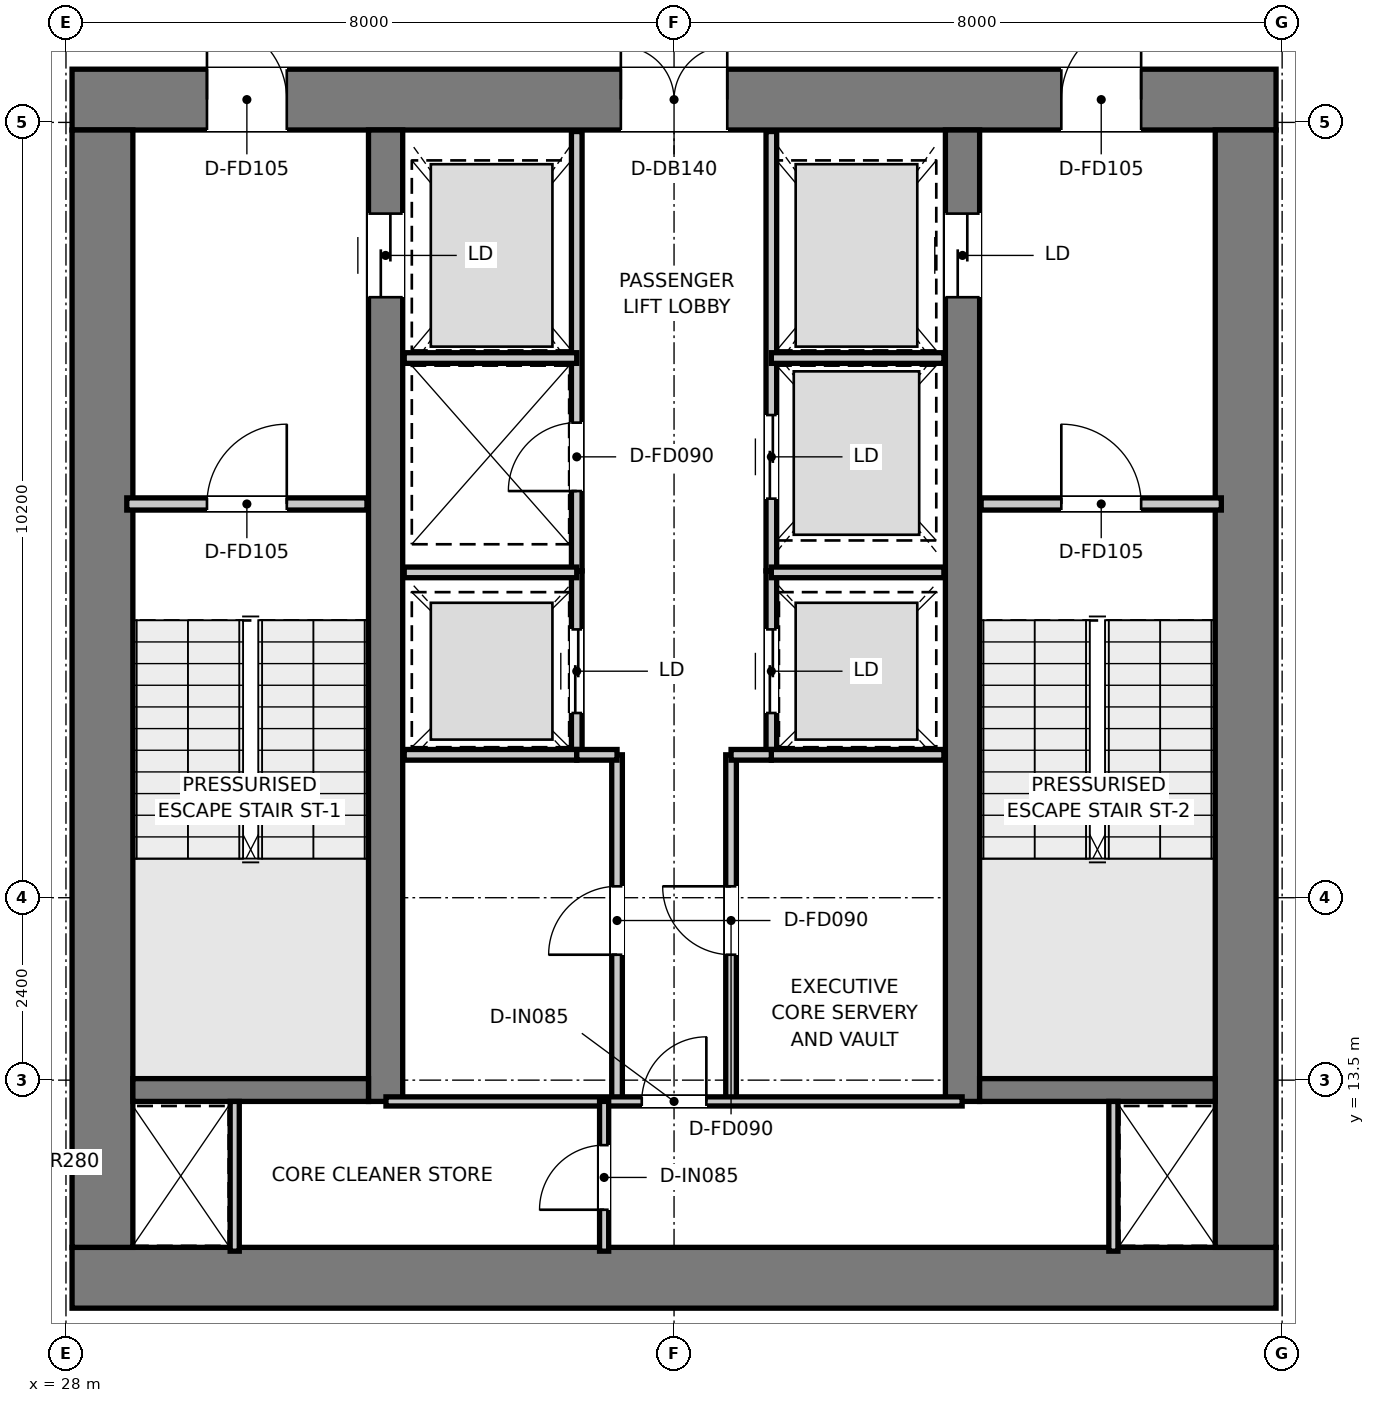
"""IFC4 building model, lengths in metres.
Left out: names, types, materials, properties, quantities, classifications, styles, units other than length and angle.
Written with IfcOpenShell. Run it as: python <this file> out.ifc"""

import sys

from ifc_helpers import new_model, si_unit, direction, frame, frame_2d, origin, place, context, subcontext, project, spatial, rectangle, extrude, element, fill, save


model = new_model("IFC4")
c1 = context("Model", 3, precision=1e-05, world=origin(), true_north=direction((0.0, 1.0)))
c2 = subcontext(c1, "Body", "Model", "MODEL_VIEW")
j1 = project(units=[si_unit("LENGTHUNIT", "METRE"), si_unit("PLANEANGLEUNIT", "RADIAN")], contexts=[c1])
p1 = place(None, origin())
s1 = spatial("IfcSite", under=j1, at=p1, CompositionType="ELEMENT")
p2 = place(p1, origin())
s2 = spatial("IfcBuilding", under=s1, at=p2, CompositionType="ELEMENT")
p3 = place(p2, frame((0.0, 0.0, 291.1)))
s3 = spatial("IfcBuildingStorey", under=s2, at=p3, CompositionType="ELEMENT", Elevation=291.1)
p4 = place(p3, frame((28.08, 10.9, 0.0), z_axis=(0.0, 0.0, 1.0), x_axis=(1.0, 0.0, 0.0)))
e1 = element("IfcWall", 1, at=p4, inside=s3, PredefinedType="SHEAR", context=c2, shape_type="SweptSolid", body=[
    extrude(rectangle(XDim=15.84, YDim=0.8, at=frame_2d((7.92, 0.0))), origin(), (0.0, 0.0, 1.0), 3.95),
])
p5 = place(p3, frame((28.08, 26.4, 0.0), z_axis=(0.0, 0.0, 1.0), x_axis=(1.0, 0.0, 0.0)))
e2 = element("IfcWall", 2, at=p5, inside=s3, PredefinedType="SHEAR", context=c2, shape_type="SweptSolid", body=[
    extrude(rectangle(XDim=15.84, YDim=0.8, at=frame_2d((7.92, 0.0))), origin(), (0.0, 0.0, 1.0), 3.95),
])
p6 = place(p5, frame((7.22, 0.0, 0.0)))
e3 = element("IfcOpeningElement", 3, at=p6, cuts=e2, PredefinedType="OPENING", context=c2, shape_type="SweptSolid", body=[
    extrude(rectangle(XDim=1.4, YDim=2.2, at=frame_2d((0.7, 1.1))), frame((0.0, 0.41, 0.0), z_axis=(0.0, -1.0, 0.0), x_axis=(1.0, 0.0, 0.0)), (0.0, 0.0, 1.0), 0.82),
])
p7 = place(p5, frame((1.775, 0.0, 0.0)))
e4 = element("IfcOpeningElement", 4, at=p7, cuts=e2, PredefinedType="OPENING", context=c2, shape_type="SweptSolid", body=[
    extrude(rectangle(XDim=1.05, YDim=2.1, at=frame_2d((0.525, 1.05))), frame((0.0, 0.41, 0.0), z_axis=(0.0, -1.0, 0.0), x_axis=(1.0, 0.0, 0.0)), (0.0, 0.0, 1.0), 0.82),
])
p8 = place(p5, frame((13.015, 0.0, 0.0)))
e5 = element("IfcOpeningElement", 5, at=p8, cuts=e2, PredefinedType="OPENING", context=c2, shape_type="SweptSolid", body=[
    extrude(rectangle(XDim=1.05, YDim=2.1, at=frame_2d((0.525, 1.05))), frame((0.0, 0.41, 0.0), z_axis=(0.0, -1.0, 0.0), x_axis=(1.0, 0.0, 0.0)), (0.0, 0.0, 1.0), 0.82),
])
for number, where, z_axis, x_axis in (
    (6, (28.48, 11.3, 0.0), (0.0, 0.0, 1.0), (0.0, 1.0, 0.0)),
    (7, (43.52, 11.3, 0.0), (0.0, 0.0, 1.0), (0.0, 1.0, 0.0)),
):
    element("IfcWall", number, at=place(p3, frame(where, z_axis=z_axis, x_axis=x_axis)), inside=s3, PredefinedType="SHEAR", context=c2, shape_type="SweptSolid", body=[
        extrude(rectangle(XDim=14.7, YDim=0.8, at=frame_2d((7.35, 0.0))), origin(), (0.0, 0.0, 1.0), 3.95),
    ])
p9 = place(p3, frame((32.205, 13.22, 0.0), z_axis=(0.0, 0.0, 1.0), x_axis=(0.0, 1.0, 0.0)))
e8 = element("IfcWall", 8, at=p9, inside=s3, PredefinedType="SHEAR", context=c2, shape_type="SweptSolid", body=[
    extrude(rectangle(XDim=12.78, YDim=0.45, at=frame_2d((6.39, 0.0))), origin(), (0.0, 0.0, 1.0), 3.95),
])
p10 = place(p9, frame((10.58, 0.0, 0.0)))
e9 = element("IfcOpeningElement", 9, at=p10, cuts=e8, PredefinedType="OPENING", context=c2, shape_type="SweptSolid", body=[
    extrude(rectangle(XDim=1.1, YDim=2.15, at=frame_2d((0.55, 1.075))), frame((0.0, 0.235, 0.0), z_axis=(0.0, -1.0, 0.0), x_axis=(1.0, 0.0, 0.0)), (0.0, 0.0, 1.0), 0.47),
])
p11 = place(p3, frame((39.795, 13.22, 0.0), z_axis=(0.0, 0.0, 1.0), x_axis=(0.0, 1.0, 0.0)))
e10 = element("IfcWall", 10, at=p11, inside=s3, PredefinedType="SHEAR", context=c2, shape_type="SweptSolid", body=[
    extrude(rectangle(XDim=12.78, YDim=0.45, at=frame_2d((6.39, 0.0))), origin(), (0.0, 0.0, 1.0), 3.95),
])
p12 = place(p11, frame((10.58, 0.0, 0.0)))
e11 = element("IfcOpeningElement", 11, at=p12, cuts=e10, PredefinedType="OPENING", context=c2, shape_type="SweptSolid", body=[
    extrude(rectangle(XDim=1.1, YDim=2.15, at=frame_2d((0.55, 1.075))), frame((0.0, 0.235, 0.0), z_axis=(0.0, -1.0, 0.0), x_axis=(1.0, 0.0, 0.0)), (0.0, 0.0, 1.0), 0.47),
])
for number, where, z_axis, x_axis in (
    (12, (28.88, 13.37, 0.0), (0.0, 0.0, 1.0), (1.0, 0.0, 0.0)),
    (13, (40.02, 13.37, 0.0), (0.0, 0.0, 1.0), (1.0, 0.0, 0.0)),
):
    element("IfcWall", number, at=place(p3, frame(where, z_axis=z_axis, x_axis=x_axis)), inside=s3, PredefinedType="SHEAR", context=c2, shape_type="SweptSolid", body=[
        extrude(rectangle(XDim=3.1, YDim=0.3, at=frame_2d((1.55, 0.0))), origin(), (0.0, 0.0, 1.0), 3.95),
    ])
p13 = place(p3, frame((28.8, 21.08, 0.0), z_axis=(0.0, 0.0, 1.0), x_axis=(1.0, 0.0, 0.0)))
e14 = element("IfcWall", 14, at=p13, inside=s3, PredefinedType="PARTITIONING", context=c2, shape_type="SweptSolid", body=[
    extrude(rectangle(XDim=3.16, YDim=0.16, at=frame_2d((1.58, 0.0))), origin(), (0.0, 0.0, 1.0), 3.67),
])
p14 = place(p13, frame((1.055, 0.0, 0.0)))
e15 = element("IfcOpeningElement", 15, at=p14, cuts=e14, PredefinedType="OPENING", context=c2, shape_type="SweptSolid", body=[
    extrude(rectangle(XDim=1.05, YDim=2.1, at=frame_2d((0.525, 1.05))), frame((0.0, 0.09, 0.0), z_axis=(0.0, -1.0, 0.0), x_axis=(1.0, 0.0, 0.0)), (0.0, 0.0, 1.0), 0.18),
])
p15 = place(p3, frame((40.04, 21.08, 0.0), z_axis=(0.0, 0.0, 1.0), x_axis=(1.0, 0.0, 0.0)))
e16 = element("IfcWall", 16, at=p15, inside=s3, PredefinedType="PARTITIONING", context=c2, shape_type="SweptSolid", body=[
    extrude(rectangle(XDim=3.16, YDim=0.16, at=frame_2d((1.58, 0.0))), origin(), (0.0, 0.0, 1.0), 3.67),
])
p16 = place(p15, frame((1.055, 0.0, 0.0)))
e17 = element("IfcOpeningElement", 17, at=p16, cuts=e16, PredefinedType="OPENING", context=c2, shape_type="SweptSolid", body=[
    extrude(rectangle(XDim=1.05, YDim=2.1, at=frame_2d((0.525, 1.05))), frame((0.0, 0.09, 0.0), z_axis=(0.0, -1.0, 0.0), x_axis=(1.0, 0.0, 0.0)), (0.0, 0.0, 1.0), 0.18),
])
p17 = place(p3, frame((34.72, 20.2, 0.0), z_axis=(0.0, 0.0, 1.0), x_axis=(0.0, 1.0, 0.0)))
e18 = element("IfcWall", 18, at=p17, inside=s3, PredefinedType="PARTITIONING", context=c2, shape_type="SweptSolid", body=[
    extrude(rectangle(XDim=5.78, YDim=0.14, at=frame_2d((2.89, 0.0))), origin(), (0.0, 0.0, 1.0), 2.82),
])
p18 = place(p17, frame((1.05, 0.0, 0.0)))
e19 = element("IfcOpeningElement", 19, at=p18, cuts=e18, PredefinedType="OPENING", context=c2, shape_type="SweptSolid", body=[
    extrude(rectangle(XDim=0.9, YDim=2.1, at=frame_2d((0.45, 1.05))), frame((0.0, 0.08, 0.0), z_axis=(0.0, -1.0, 0.0), x_axis=(1.0, 0.0, 0.0)), (0.0, 0.0, 1.0), 0.16),
])
p19 = place(p3, frame((37.28, 20.2, 0.0), z_axis=(0.0, 0.0, 1.0), x_axis=(0.0, 1.0, 0.0)))
e20 = element("IfcWall", 20, at=p19, inside=s3, PredefinedType="PARTITIONING", context=c2, shape_type="SweptSolid", body=[
    extrude(rectangle(XDim=5.78, YDim=0.14, at=frame_2d((2.89, 0.0))), origin(), (0.0, 0.0, 1.0), 2.82),
])
p20 = place(p19, frame((0.95, 0.0, 0.0)))
e21 = element("IfcOpeningElement", 21, at=p20, cuts=e20, PredefinedType="OPENING", context=c2, shape_type="SweptSolid", body=[
    extrude(rectangle(XDim=1.1, YDim=2.15, at=frame_2d((0.55, 1.075))), frame((0.0, 0.08, 0.0), z_axis=(0.0, -1.0, 0.0), x_axis=(1.0, 0.0, 0.0)), (0.0, 0.0, 1.0), 0.16),
])
for number, where, z_axis, x_axis in (
    (22, (32.45, 23.0, 0.0), (0.0, 0.0, 1.0), (1.0, 0.0, 0.0)),
    (23, (37.28, 23.0, 0.0), (0.0, 0.0, 1.0), (1.0, 0.0, 0.0)),
):
    element("IfcWall", number, at=place(p3, frame(where, z_axis=z_axis, x_axis=x_axis)), inside=s3, PredefinedType="PARTITIONING", context=c2, shape_type="SweptSolid", body=[
        extrude(rectangle(XDim=2.27, YDim=0.14, at=frame_2d((1.135, 0.0))), origin(), (0.0, 0.0, 1.0), 2.82),
    ])
p21 = place(p3, frame((34.72, 17.78, 0.0), z_axis=(0.0, 0.0, 1.0), x_axis=(0.0, 1.0, 0.0)))
e24 = element("IfcWall", 24, at=p21, inside=s3, PredefinedType="PARTITIONING", context=c2, shape_type="SweptSolid", body=[
    extrude(rectangle(XDim=2.42, YDim=0.14, at=frame_2d((1.21, 0.0))), origin(), (0.0, 0.0, 1.0), 3.67),
])
p22 = place(p21, frame((0.55, 0.0, 0.0)))
e25 = element("IfcOpeningElement", 25, at=p22, cuts=e24, PredefinedType="OPENING", context=c2, shape_type="SweptSolid", body=[
    extrude(rectangle(XDim=1.1, YDim=2.15, at=frame_2d((0.55, 1.075))), frame((0.0, 0.08, 0.0), z_axis=(0.0, -1.0, 0.0), x_axis=(1.0, 0.0, 0.0)), (0.0, 0.0, 1.0), 0.16),
])
p23 = place(p3, frame((37.28, 17.78, 0.0), z_axis=(0.0, 0.0, 1.0), x_axis=(0.0, 1.0, 0.0)))
e26 = element("IfcWall", 26, at=p23, inside=s3, PredefinedType="PARTITIONING", context=c2, shape_type="SweptSolid", body=[
    extrude(rectangle(XDim=2.42, YDim=0.14, at=frame_2d((1.21, 0.0))), origin(), (0.0, 0.0, 1.0), 3.67),
])
p24 = place(p23, frame((0.55, 0.0, 0.0)))
e27 = element("IfcOpeningElement", 27, at=p24, cuts=e26, PredefinedType="OPENING", context=c2, shape_type="SweptSolid", body=[
    extrude(rectangle(XDim=1.1, YDim=2.15, at=frame_2d((0.55, 1.075))), frame((0.0, 0.08, 0.0), z_axis=(0.0, -1.0, 0.0), x_axis=(1.0, 0.0, 0.0)), (0.0, 0.0, 1.0), 0.16),
])
for number, where, z_axis, x_axis in (
    (28, (32.45, 17.78, 0.0), (0.0, 0.0, 1.0), (1.0, 0.0, 0.0)),
    (29, (32.45, 20.18, 0.0), (0.0, 0.0, 1.0), (1.0, 0.0, 0.0)),
    (30, (37.28, 17.78, 0.0), (0.0, 0.0, 1.0), (1.0, 0.0, 0.0)),
    (31, (37.28, 20.18, 0.0), (0.0, 0.0, 1.0), (1.0, 0.0, 0.0)),
):
    element("IfcWall", number, at=place(p3, frame(where, z_axis=z_axis, x_axis=x_axis)), inside=s3, PredefinedType="PARTITIONING", context=c2, shape_type="SweptSolid", body=[
        extrude(rectangle(XDim=2.27, YDim=0.14, at=frame_2d((1.135, 0.0))), origin(), (0.0, 0.0, 1.0), 3.67),
    ])
p25 = place(p3, frame((35.25, 13.22, 0.0), z_axis=(0.0, 0.0, 1.0), x_axis=(0.0, 1.0, 0.0)))
e32 = element("IfcWall", 32, at=p25, inside=s3, PredefinedType="PARTITIONING", context=c2, shape_type="SweptSolid", body=[
    extrude(rectangle(XDim=4.56, YDim=0.14, at=frame_2d((2.28, 0.0))), origin(), (0.0, 0.0, 1.0), 3.67),
])
p26 = place(p25, frame((1.93, 0.0, 0.0)))
e33 = element("IfcOpeningElement", 33, at=p26, cuts=e32, PredefinedType="OPENING", context=c2, shape_type="SweptSolid", body=[
    extrude(rectangle(XDim=0.9, YDim=2.1, at=frame_2d((0.45, 1.05))), frame((0.0, 0.08, 0.0), z_axis=(0.0, -1.0, 0.0), x_axis=(1.0, 0.0, 0.0)), (0.0, 0.0, 1.0), 0.16),
])
p27 = place(p3, frame((34.72, 17.78, 0.0), z_axis=(0.0, 0.0, 1.0), x_axis=(1.0, 0.0, 0.0)))
e34 = element("IfcWall", 34, at=p27, inside=s3, PredefinedType="PARTITIONING", context=c2, shape_type="SweptSolid", body=[
    extrude(rectangle(XDim=0.53, YDim=0.14, at=frame_2d((0.265, 0.0))), origin(), (0.0, 0.0, 1.0), 3.67),
])
p28 = place(p3, frame((36.75, 13.22, 0.0), z_axis=(0.0, 0.0, 1.0), x_axis=(0.0, 1.0, 0.0)))
e35 = element("IfcWall", 35, at=p28, inside=s3, PredefinedType="PARTITIONING", context=c2, shape_type="SweptSolid", body=[
    extrude(rectangle(XDim=4.56, YDim=0.14, at=frame_2d((2.28, 0.0))), origin(), (0.0, 0.0, 1.0), 3.67),
])
p29 = place(p28, frame((1.93, 0.0, 0.0)))
e36 = element("IfcOpeningElement", 36, at=p29, cuts=e35, PredefinedType="OPENING", context=c2, shape_type="SweptSolid", body=[
    extrude(rectangle(XDim=0.9, YDim=2.1, at=frame_2d((0.45, 1.05))), frame((0.0, 0.08, 0.0), z_axis=(0.0, -1.0, 0.0), x_axis=(1.0, 0.0, 0.0)), (0.0, 0.0, 1.0), 0.16),
])
p30 = place(p3, frame((36.75, 17.78, 0.0), z_axis=(0.0, 0.0, 1.0), x_axis=(1.0, 0.0, 0.0)))
e37 = element("IfcWall", 37, at=p30, inside=s3, PredefinedType="PARTITIONING", context=c2, shape_type="SweptSolid", body=[
    extrude(rectangle(XDim=0.53, YDim=0.14, at=frame_2d((0.265, 0.0))), origin(), (0.0, 0.0, 1.0), 3.67),
])
for number, where, z_axis, x_axis in (
    (38, (30.22, 11.25, 0.0), (0.0, 0.0, 1.0), (0.0, 1.0, 0.0)),
    (39, (41.78, 11.25, 0.0), (0.0, 0.0, 1.0), (0.0, 1.0, 0.0)),
):
    element("IfcWall", number, at=place(p3, frame(where, z_axis=z_axis, x_axis=x_axis)), inside=s3, PredefinedType="PARTITIONING", context=c2, shape_type="SweptSolid", body=[
        extrude(rectangle(XDim=1.97, YDim=0.12, at=frame_2d((0.985, 0.0))), origin(), (0.0, 0.0, 1.0), 3.67),
    ])
p31 = place(p3, frame((32.21, 13.22, 0.0), z_axis=(0.0, 0.0, 1.0), x_axis=(1.0, 0.0, 0.0)))
e40 = element("IfcWall", 40, at=p31, inside=s3, PredefinedType="PARTITIONING", context=c2, shape_type="SweptSolid", body=[
    extrude(rectangle(XDim=7.58, YDim=0.12, at=frame_2d((3.79, 0.0))), origin(), (0.0, 0.0, 1.0), 3.67),
])
p32 = place(p31, frame((3.365, 0.0, 0.0)))
e41 = element("IfcOpeningElement", 41, at=p32, cuts=e40, PredefinedType="OPENING", context=c2, shape_type="SweptSolid", body=[
    extrude(rectangle(XDim=0.85, YDim=2.1, at=frame_2d((0.425, 1.05))), frame((0.0, 0.07, 0.0), z_axis=(0.0, -1.0, 0.0), x_axis=(1.0, 0.0, 0.0)), (0.0, 0.0, 1.0), 0.14),
])
p33 = place(p3, frame((35.08, 11.25, 0.0), z_axis=(0.0, 0.0, 1.0), x_axis=(0.0, 1.0, 0.0)))
e42 = element("IfcWall", 42, at=p33, inside=s3, PredefinedType="PARTITIONING", context=c2, shape_type="SweptSolid", body=[
    extrude(rectangle(XDim=1.97, YDim=0.12, at=frame_2d((0.985, 0.0))), origin(), (0.0, 0.0, 1.0), 3.67),
])
p34 = place(p33, frame((0.545, 0.0, 0.0)))
e43 = element("IfcOpeningElement", 43, at=p34, cuts=e42, PredefinedType="OPENING", context=c2, shape_type="SweptSolid", body=[
    extrude(rectangle(XDim=0.85, YDim=2.1, at=frame_2d((0.425, 1.05))), frame((0.0, 0.07, 0.0), z_axis=(0.0, -1.0, 0.0), x_axis=(1.0, 0.0, 0.0)), (0.0, 0.0, 1.0), 0.14),
])
p35 = place(p14, origin())
e44 = element("IfcDoor", 44, at=p35, inside=s3, OperationType="SINGLE_SWING_RIGHT", PredefinedType="DOOR", context=c2, shape_type="SweptSolid", body=[
    extrude(rectangle(XDim=1.05, YDim=2.1, at=frame_2d((0.525, 1.05))), frame((0.0, 0.025, 0.0), z_axis=(0.0, -1.0, 0.0), x_axis=(1.0, 0.0, 0.0)), (0.0, 0.0, 1.0), 0.05),
])
fill(e15, e44)
p36 = place(p16, origin())
e45 = element("IfcDoor", 45, at=p36, inside=s3, OperationType="SINGLE_SWING_LEFT", PredefinedType="DOOR", context=c2, shape_type="SweptSolid", body=[
    extrude(rectangle(XDim=1.05, YDim=2.1, at=frame_2d((0.525, 1.05))), frame((0.0, 0.025, 0.0), z_axis=(0.0, -1.0, 0.0), x_axis=(1.0, 0.0, 0.0)), (0.0, 0.0, 1.0), 0.05),
])
fill(e17, e45)
p37 = place(p6, origin())
e46 = element("IfcDoor", 46, at=p37, inside=s3, OperationType="DOUBLE_DOOR_SINGLE_SWING", PredefinedType="DOOR", context=c2, shape_type="SweptSolid", body=[
    extrude(rectangle(XDim=1.4, YDim=2.2, at=frame_2d((0.7, 1.1))), frame((0.0, 0.025, 0.0), z_axis=(0.0, -1.0, 0.0), x_axis=(1.0, 0.0, 0.0)), (0.0, 0.0, 1.0), 0.05),
])
fill(e3, e46)
p38 = place(p7, origin())
e47 = element("IfcDoor", 47, at=p38, inside=s3, OperationType="SINGLE_SWING_LEFT", PredefinedType="DOOR", context=c2, shape_type="SweptSolid", body=[
    extrude(rectangle(XDim=1.05, YDim=2.1, at=frame_2d((0.525, 1.05))), frame((0.0, 0.025, 0.0), z_axis=(0.0, -1.0, 0.0), x_axis=(1.0, 0.0, 0.0)), (0.0, 0.0, 1.0), 0.05),
])
fill(e4, e47)
p39 = place(p8, origin())
e48 = element("IfcDoor", 48, at=p39, inside=s3, OperationType="SINGLE_SWING_RIGHT", PredefinedType="DOOR", context=c2, shape_type="SweptSolid", body=[
    extrude(rectangle(XDim=1.05, YDim=2.1, at=frame_2d((0.525, 1.05))), frame((0.0, 0.025, 0.0), z_axis=(0.0, -1.0, 0.0), x_axis=(1.0, 0.0, 0.0)), (0.0, 0.0, 1.0), 0.05),
])
fill(e5, e48)
p40 = place(p10, origin())
e49 = element("IfcDoor", 49, at=p40, inside=s3, OperationType="DOUBLE_DOOR_SLIDING", PredefinedType="DOOR", context=c2, shape_type="SweptSolid", body=[
    extrude(rectangle(XDim=1.1, YDim=2.15, at=frame_2d((0.55, 1.075))), frame((0.0, 0.025, 0.0), z_axis=(0.0, -1.0, 0.0), x_axis=(1.0, 0.0, 0.0)), (0.0, 0.0, 1.0), 0.05),
])
fill(e9, e49)
p41 = place(p12, origin())
e50 = element("IfcDoor", 50, at=p41, inside=s3, OperationType="DOUBLE_DOOR_SLIDING", PredefinedType="DOOR", context=c2, shape_type="SweptSolid", body=[
    extrude(rectangle(XDim=1.1, YDim=2.15, at=frame_2d((0.55, 1.075))), frame((0.0, 0.025, 0.0), z_axis=(0.0, -1.0, 0.0), x_axis=(1.0, 0.0, 0.0)), (0.0, 0.0, 1.0), 0.05),
])
fill(e11, e50)
p42 = place(p18, origin())
e51 = element("IfcDoor", 51, at=p42, inside=s3, OperationType="SINGLE_SWING_LEFT", PredefinedType="DOOR", context=c2, shape_type="SweptSolid", body=[
    extrude(rectangle(XDim=0.9, YDim=2.1, at=frame_2d((0.45, 1.05))), frame((0.0, 0.025, 0.0), z_axis=(0.0, -1.0, 0.0), x_axis=(1.0, 0.0, 0.0)), (0.0, 0.0, 1.0), 0.05),
])
fill(e19, e51)
p43 = place(p20, origin())
e52 = element("IfcDoor", 52, at=p43, inside=s3, OperationType="DOUBLE_DOOR_SLIDING", PredefinedType="DOOR", context=c2, shape_type="SweptSolid", body=[
    extrude(rectangle(XDim=1.1, YDim=2.15, at=frame_2d((0.55, 1.075))), frame((0.0, 0.025, 0.0), z_axis=(0.0, -1.0, 0.0), x_axis=(1.0, 0.0, 0.0)), (0.0, 0.0, 1.0), 0.05),
])
fill(e21, e52)
p44 = place(p22, origin())
e53 = element("IfcDoor", 53, at=p44, inside=s3, OperationType="DOUBLE_DOOR_SLIDING", PredefinedType="DOOR", context=c2, shape_type="SweptSolid", body=[
    extrude(rectangle(XDim=1.1, YDim=2.15, at=frame_2d((0.55, 1.075))), frame((0.0, 0.025, 0.0), z_axis=(0.0, -1.0, 0.0), x_axis=(1.0, 0.0, 0.0)), (0.0, 0.0, 1.0), 0.05),
])
fill(e25, e53)
p45 = place(p24, origin())
e54 = element("IfcDoor", 54, at=p45, inside=s3, OperationType="DOUBLE_DOOR_SLIDING", PredefinedType="DOOR", context=c2, shape_type="SweptSolid", body=[
    extrude(rectangle(XDim=1.1, YDim=2.15, at=frame_2d((0.55, 1.075))), frame((0.0, 0.025, 0.0), z_axis=(0.0, -1.0, 0.0), x_axis=(1.0, 0.0, 0.0)), (0.0, 0.0, 1.0), 0.05),
])
fill(e27, e54)
p46 = place(p26, origin())
e55 = element("IfcDoor", 55, at=p46, inside=s3, OperationType="SINGLE_SWING_LEFT", PredefinedType="DOOR", context=c2, shape_type="SweptSolid", body=[
    extrude(rectangle(XDim=0.9, YDim=2.1, at=frame_2d((0.45, 1.05))), frame((0.0, 0.025, 0.0), z_axis=(0.0, -1.0, 0.0), x_axis=(1.0, 0.0, 0.0)), (0.0, 0.0, 1.0), 0.05),
])
fill(e33, e55)
p47 = place(p29, origin())
e56 = element("IfcDoor", 56, at=p47, inside=s3, OperationType="SINGLE_SWING_RIGHT", PredefinedType="DOOR", context=c2, shape_type="SweptSolid", body=[
    extrude(rectangle(XDim=0.9, YDim=2.1, at=frame_2d((0.45, 1.05))), frame((0.0, 0.025, 0.0), z_axis=(0.0, -1.0, 0.0), x_axis=(1.0, 0.0, 0.0)), (0.0, 0.0, 1.0), 0.05),
])
fill(e36, e56)
p48 = place(p32, origin())
e57 = element("IfcDoor", 57, at=p48, inside=s3, OperationType="SINGLE_SWING_RIGHT", PredefinedType="DOOR", context=c2, shape_type="SweptSolid", body=[
    extrude(rectangle(XDim=0.85, YDim=2.1, at=frame_2d((0.425, 1.05))), frame((0.0, 0.025, 0.0), z_axis=(0.0, -1.0, 0.0), x_axis=(1.0, 0.0, 0.0)), (0.0, 0.0, 1.0), 0.05),
])
fill(e41, e57)
p49 = place(p34, origin())
e58 = element("IfcDoor", 58, at=p49, inside=s3, OperationType="SINGLE_SWING_LEFT", PredefinedType="DOOR", context=c2, shape_type="SweptSolid", body=[
    extrude(rectangle(XDim=0.85, YDim=2.1, at=frame_2d((0.425, 1.05))), frame((0.0, 0.025, 0.0), z_axis=(0.0, -1.0, 0.0), x_axis=(1.0, 0.0, 0.0)), (0.0, 0.0, 1.0), 0.05),
])
fill(e43, e58)
save(model, sys.argv[1])
